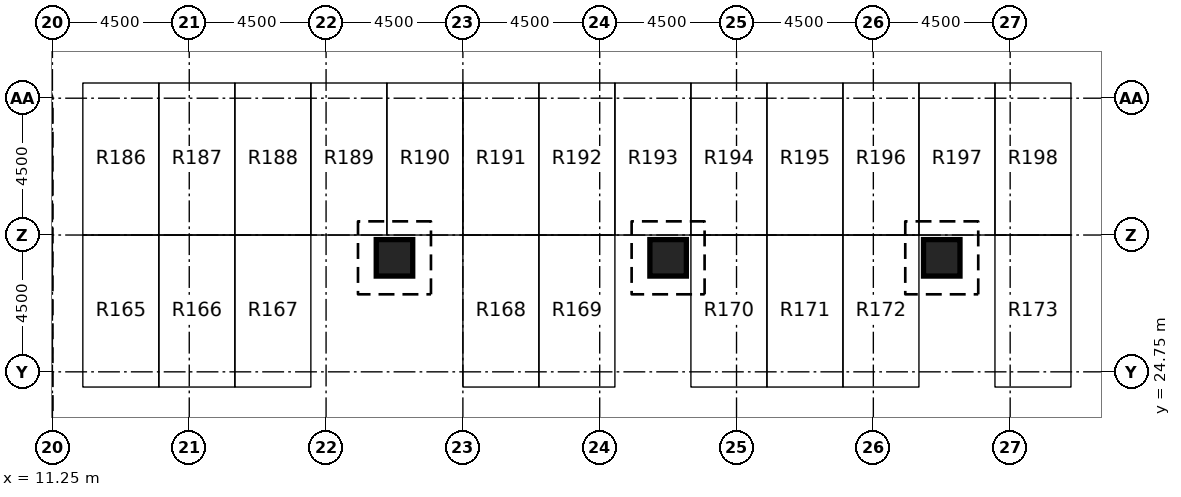
"""IFC4 building model, lengths in metres.
Left out: names, types, materials, properties, quantities, classifications, styles, units other than length and angle.
Written with IfcOpenShell. Run it as: python <this file> out.ifc"""

import sys

from ifc_helpers import new_model, si_unit, direction, frame, origin, origin_2d, place, context, subcontext, project, spatial, rectangle, extrude, element, save


model = new_model("IFC4")
c1 = context("Model", 3, precision=1e-05, world=origin(), true_north=direction((0.0, 1.0)))
c2 = subcontext(c1, "Body", "Model", "MODEL_VIEW")
j1 = project(units=[si_unit("LENGTHUNIT", "METRE"), si_unit("PLANEANGLEUNIT", "RADIAN")], contexts=[c1])
p1 = place(None, origin())
s1 = spatial("IfcSite", under=j1, at=p1, CompositionType="ELEMENT")
p2 = place(p1, origin())
s2 = spatial("IfcBuilding", under=s1, at=p2, CompositionType="ELEMENT")
p3 = place(p2, frame((0.0, 0.0, -8.0)))
s3 = spatial("IfcBuildingStorey", under=s2, at=p3, CompositionType="ELEMENT", Elevation=-8.0)
for number, where, z_axis, x_axis in (
    (1, (22.5, 28.5, 0.0), (0.0, 0.0, 1.0), (1.0, 0.0, 0.0)),
    (2, (31.5, 28.5, 0.0), (0.0, 0.0, 1.0), (1.0, 0.0, 0.0)),
    (3, (40.5, 28.5, 0.0), (0.0, 0.0, 1.0), (1.0, 0.0, 0.0)),
):
    element("IfcColumn", number, at=place(p3, frame(where, z_axis=z_axis, x_axis=x_axis)), inside=s3, PredefinedType="COLUMN", context=c2, shape_type="SweptSolid", body=[
        extrude(rectangle(XDim=1.2, YDim=1.2, at=origin_2d()), origin(), (0.0, 0.0, 1.0), 3.4),
    ])
save(model, sys.argv[1])
